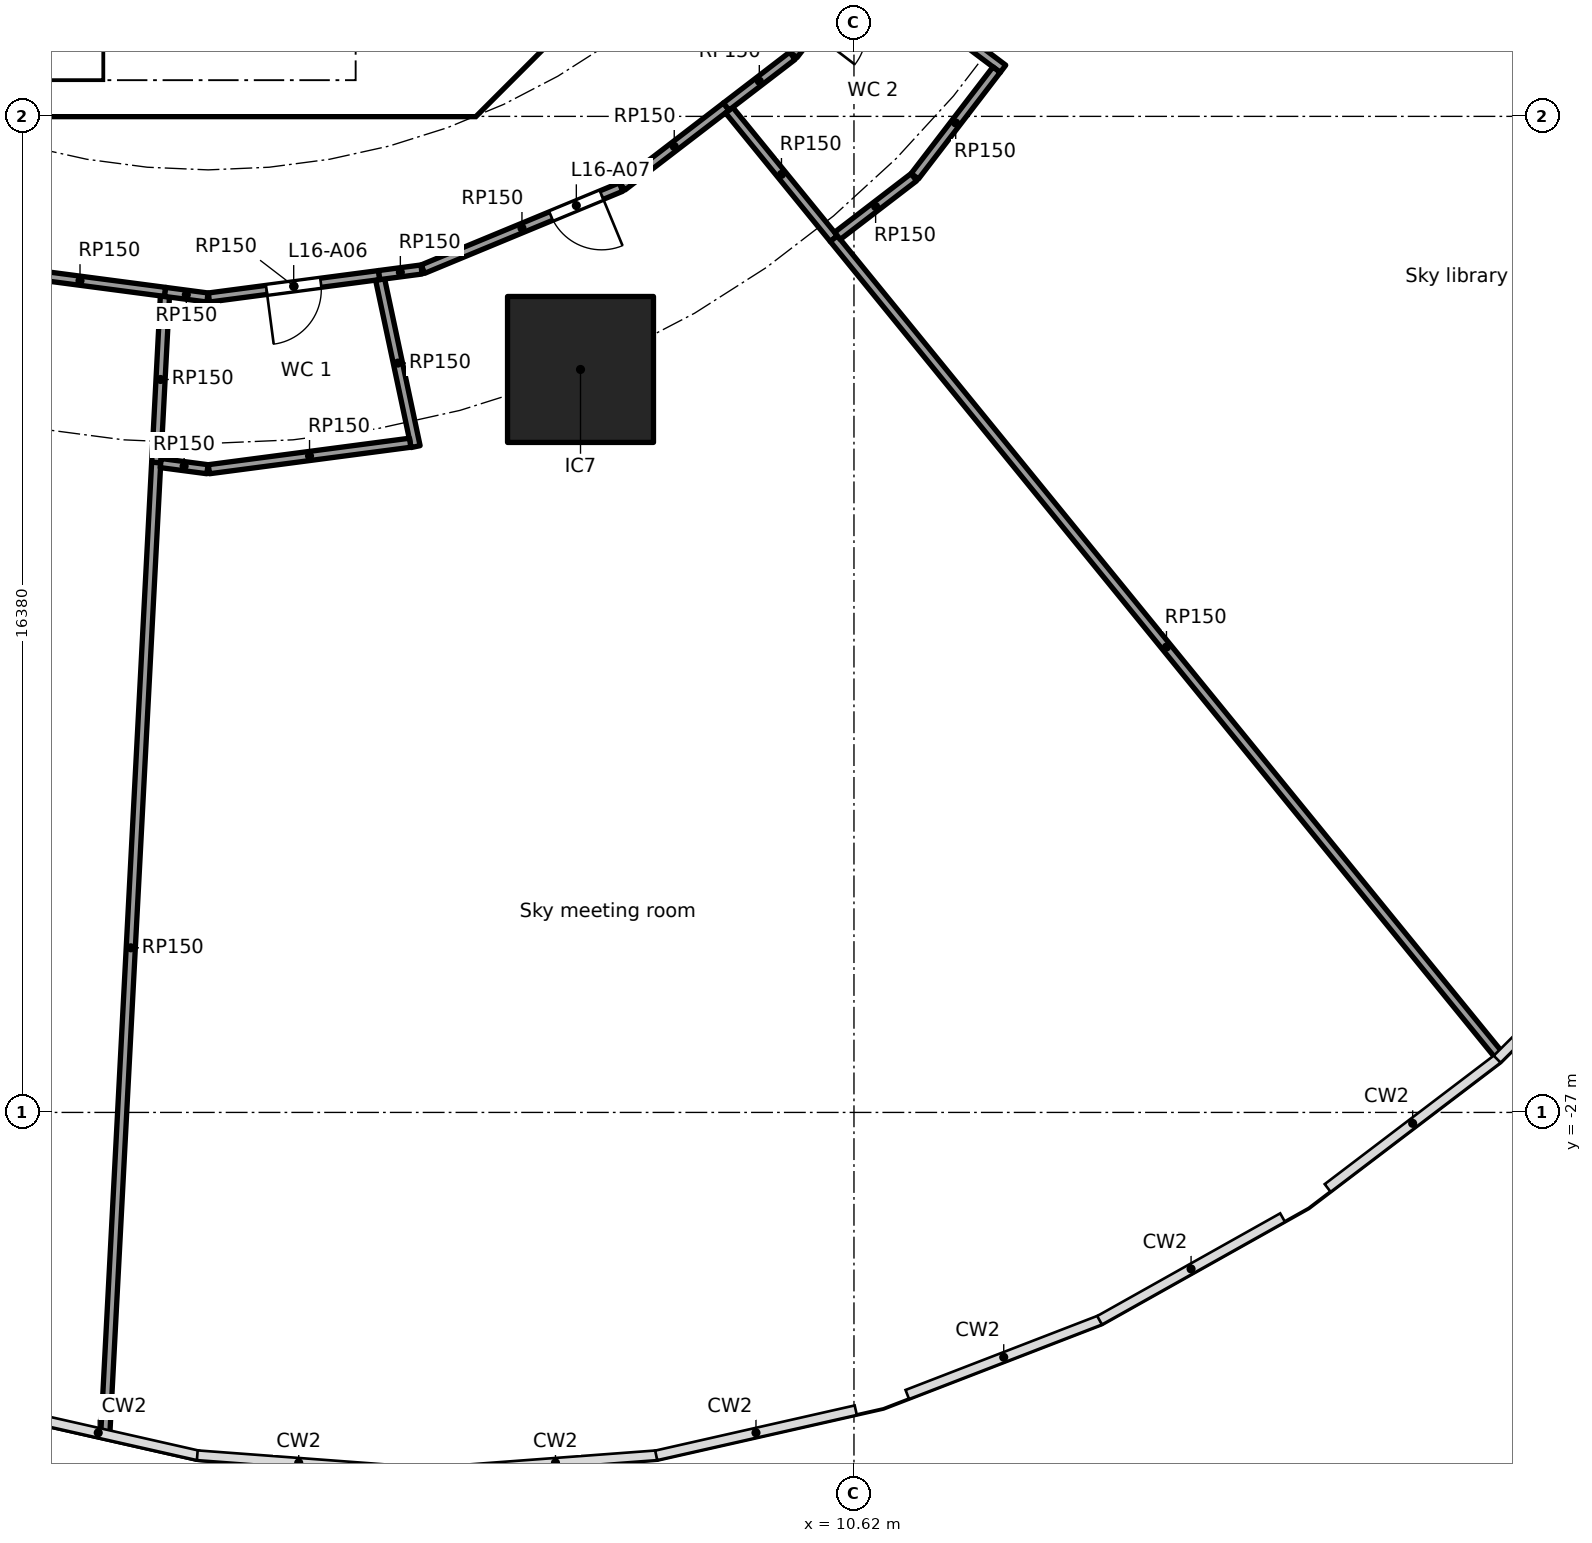
"""IFC4 building model, lengths in metres.
Left out: names, types, materials, properties, quantities, classifications, styles, units other than length and angle.
Written with IfcOpenShell. Run it as: python <this file> out.ifc"""

import sys

from ifc_helpers import new_model, si_unit, direction, frame, frame_2d, origin, origin_2d, place, context, subcontext, project, spatial, polyline, rectangle, outline, extrude, element, fill, save


model = new_model("IFC4")
c1 = context("Model", 3, precision=1e-05, world=origin(), true_north=direction((0.0, 1.0)))
c2 = subcontext(c1, "Body", "Model", "MODEL_VIEW")
j1 = project(units=[si_unit("LENGTHUNIT", "METRE"), si_unit("PLANEANGLEUNIT", "RADIAN")], contexts=[c1])
p1 = place(None, origin())
s1 = spatial("IfcSite", under=j1, at=p1, CompositionType="ELEMENT")
p2 = place(p1, origin())
s2 = spatial("IfcBuilding", under=s1, at=p2, CompositionType="ELEMENT")
p3 = place(p2, frame((0.0, 0.0, 67.7)))
s3 = spatial("IfcBuildingStorey", under=s2, at=p3, CompositionType="ELEMENT", Elevation=67.7)
p4 = place(p3, frame((6.123, -14.782, 0.0), z_axis=(0.0, 0.0, 1.0), x_axis=(1.0, 0.0, 0.0)))
e1 = element("IfcColumn", 1, at=p4, inside=s3, PredefinedType="COLUMN", context=c2, shape_type="SweptSolid", body=[
    extrude(rectangle(XDim=2.4, YDim=2.4, at=origin_2d()), origin(), (0.0, 0.0, 1.0), 5.6),
])
p5 = place(p3, frame((4.613, -9.988, 0.0), z_axis=(0.0, 0.0, 1.0), x_axis=(0.707106781187, 0.707106781187, 0.0)))
e2 = element("IfcWall", 2, at=p5, inside=s3, PredefinedType="SHEAR", context=c2, shape_type="SweptSolid", body=[
    extrude(rectangle(XDim=7.602, YDim=0.6, at=frame_2d((3.801, 0.0))), origin(), (0.0, 0.0, 1.0), 5.34),
])
p6 = place(p5, frame((3.201, 0.0, 0.0)))
e3 = element("IfcOpeningElement", 3, at=p6, cuts=e2, PredefinedType="OPENING", context=c2, shape_type="SweptSolid", body=[
    extrude(rectangle(XDim=1.2, YDim=2.1, at=frame_2d((0.6, 1.05))), frame((0.0, 0.31, 0.0), z_axis=(0.0, -1.0, 0.0), x_axis=(1.0, 0.0, 0.0)), (0.0, 0.0, 1.0), 0.62),
])
p7 = place(p3, frame((4.0, -10.025, 0.0), z_axis=(0.0, 0.0, 1.0), x_axis=(0.0, 1.0, 0.0)))
e4 = element("IfcWall", 4, at=p7, inside=s3, PredefinedType="SOLIDWALL", context=c2, shape_type="SweptSolid", body=[
    extrude(rectangle(XDim=3.0, YDim=0.2, at=frame_2d((1.5, 0.0))), origin(), (0.0, 0.0, 1.0), 5.34),
])
p8 = place(p7, frame((0.975, 0.0, 0.0)))
e5 = element("IfcOpeningElement", 5, at=p8, cuts=e4, PredefinedType="OPENING", context=c2, shape_type="SweptSolid", body=[
    extrude(rectangle(XDim=1.1, YDim=2.1, at=frame_2d((0.55, 1.05))), frame((0.0, 0.11, 0.0), z_axis=(0.0, -1.0, 0.0), x_axis=(1.0, 0.0, 0.0)), (0.0, 0.0, 1.0), 0.22),
])
p9 = place(p3, origin())
e6 = element("IfcWall", 6, at=p9, inside=s3, PredefinedType="SHEAR", context=c2, shape_type="SweptSolid", body=[
    extrude(outline(polyline([(-4.152, -10.025), (4.152, -10.025), (4.401, -9.776), (4.825, -10.2), (4.401, -10.625), (-4.401, -10.625), (-4.825, -10.2), (-4.401, -9.776), (-4.152, -10.025)])), origin(), (0.0, 0.0, 1.0), 5.34),
])
p10 = place(p3, frame((-0.855, -16.312, 0.0), z_axis=(0.0, 0.0, 1.0), x_axis=(-0.05232715486, -0.998629995977, 0.0)))
e7 = element("IfcWall", 7, at=p10, inside=s3, PredefinedType="PARTITIONING", context=c2, shape_type="SweptSolid", body=[
    extrude(rectangle(XDim=15.985, YDim=0.15, at=frame_2d((7.992, 0.0))), origin(), (0.0, 0.0, 1.0), 5.34),
])
p11 = place(p3, frame((-0.708, -13.507, 0.0), z_axis=(0.0, 0.0, 1.0), x_axis=(-0.991443994311, 0.130532778046, 0.0)))
e8 = element("IfcWall", 8, at=p11, inside=s3, PredefinedType="PARTITIONING", context=c2, shape_type="SweptSolid", body=[
    extrude(rectangle(XDim=2.824, YDim=0.15, at=frame_2d((1.412, 0.0))), origin(), (0.0, 0.0, 1.0), 5.34),
])
p12 = place(p3, frame((-0.712, -13.582, 0.0), z_axis=(0.0, 0.0, 1.0), x_axis=(-0.052343174033, -0.99862915646, 0.0)))
e9 = element("IfcWall", 9, at=p12, inside=s3, PredefinedType="PARTITIONING", context=c2, shape_type="SweptSolid", body=[
    extrude(rectangle(XDim=2.733, YDim=0.15, at=frame_2d((1.367, 0.0))), origin(), (0.0, 0.0, 1.0), 5.34),
])
p13 = place(p3, frame((-0.012, -16.423, 0.0), z_axis=(0.0, 0.0, 1.0), x_axis=(-0.991462869305, 0.130389335417, 0.0)))
e10 = element("IfcWall", 10, at=p13, inside=s3, PredefinedType="PARTITIONING", context=c2, shape_type="SweptSolid", body=[
    extrude(rectangle(XDim=0.775, YDim=0.15, at=frame_2d((0.388, 0.0))), origin(), (0.0, 0.0, 1.0), 5.34),
])
p14 = place(p3, frame((-0.012, -13.598, 0.0), z_axis=(0.0, 0.0, 1.0), x_axis=(-0.991466123966, 0.130364585024, 0.0)))
e11 = element("IfcWall", 11, at=p14, inside=s3, PredefinedType="PARTITIONING", context=c2, shape_type="SweptSolid", body=[
    extrude(rectangle(XDim=0.702, YDim=0.15, at=frame_2d((0.351, 0.0))), origin(), (0.0, 0.0, 1.0), 5.34),
])
p15 = place(p3, frame((2.812, -13.23, 0.0), z_axis=(0.0, 0.0, 1.0), x_axis=(-0.991445467051, -0.130521591565, 0.0)))
e12 = element("IfcWall", 12, at=p15, inside=s3, PredefinedType="PARTITIONING", context=c2, shape_type="SweptSolid", body=[
    extrude(rectangle(XDim=2.824, YDim=0.15, at=frame_2d((1.412, 0.0))), origin(), (0.0, 0.0, 1.0), 5.34),
])
p16 = place(p15, frame((0.968, 0.0, 0.0)))
e13 = element("IfcOpeningElement", 13, at=p16, cuts=e12, PredefinedType="OPENING", context=c2, shape_type="SweptSolid", body=[
    extrude(rectangle(XDim=0.9, YDim=2.1, at=frame_2d((0.45, 1.05))), frame((0.0, 0.085, 0.0), z_axis=(0.0, -1.0, 0.0), x_axis=(1.0, 0.0, 0.0)), (0.0, 0.0, 1.0), 0.17),
])
p17 = place(p3, frame((2.828, -13.303, 0.0), z_axis=(0.0, 0.0, 1.0), x_axis=(0.207920091501, -0.978145815076, 0.0)))
e14 = element("IfcWall", 14, at=p17, inside=s3, PredefinedType="PARTITIONING", context=c2, shape_type="SweptSolid", body=[
    extrude(rectangle(XDim=2.809, YDim=0.15, at=frame_2d((1.404, 0.0))), origin(), (0.0, 0.0, 1.0), 5.34),
])
p18 = place(p3, frame((3.321, -15.987, 0.0), z_axis=(0.0, 0.0, 1.0), x_axis=(-0.991441844339, -0.130549106827, 0.0)))
e15 = element("IfcWall", 15, at=p18, inside=s3, PredefinedType="PARTITIONING", context=c2, shape_type="SweptSolid", body=[
    extrude(rectangle(XDim=3.338, YDim=0.15, at=frame_2d((1.669, 0.0))), origin(), (0.0, 0.0, 1.0), 5.34),
])
p19 = place(p3, frame((3.508, -13.138, 0.0), z_axis=(0.0, 0.0, 1.0), x_axis=(-0.991460212813, -0.130409533429, 0.0)))
e16 = element("IfcWall", 16, at=p19, inside=s3, PredefinedType="PARTITIONING", context=c2, shape_type="SweptSolid", body=[
    extrude(rectangle(XDim=0.702, YDim=0.15, at=frame_2d((0.351, 0.0))), origin(), (0.0, 0.0, 1.0), 5.34),
])
p20 = place(p3, frame((6.789, -11.782, 0.0), z_axis=(0.0, 0.0, 1.0), x_axis=(-0.923881838111, -0.382677866108, 0.0)))
e17 = element("IfcWall", 17, at=p20, inside=s3, PredefinedType="PARTITIONING", context=c2, shape_type="SweptSolid", body=[
    extrude(rectangle(XDim=3.527, YDim=0.15, at=frame_2d((1.763, 0.0))), origin(), (0.0, 0.0, 1.0), 5.34),
])
p21 = place(p20, frame((0.346, 0.0, 0.0)))
e18 = element("IfcOpeningElement", 18, at=p21, cuts=e17, PredefinedType="OPENING", context=c2, shape_type="SweptSolid", body=[
    extrude(rectangle(XDim=0.9, YDim=2.1, at=frame_2d((0.45, 1.05))), frame((0.0, 0.085, 0.0), z_axis=(0.0, -1.0, 0.0), x_axis=(1.0, 0.0, 0.0)), (0.0, 0.0, 1.0), 0.17),
])
p22 = place(p3, frame((8.519, -10.459, 0.0), z_axis=(0.0, 0.0, 1.0), x_axis=(-0.793372937326, -0.608735888805, 0.0)))
e19 = element("IfcWall", 19, at=p22, inside=s3, PredefinedType="PARTITIONING", context=c2, shape_type="SweptSolid", body=[
    extrude(rectangle(XDim=2.155, YDim=0.15, at=frame_2d((1.078, 0.0))), origin(), (0.0, 0.0, 1.0), 5.34),
])
p23 = place(p3, frame((8.567, -10.517, 0.0), z_axis=(0.0, 0.0, 1.0), x_axis=(0.631573271363, -0.775316195432, 0.0)))
e20 = element("IfcWall", 20, at=p23, inside=s3, PredefinedType="PARTITIONING", context=c2, shape_type="SweptSolid", body=[
    extrude(rectangle(XDim=2.726, YDim=0.15, at=frame_2d((1.363, 0.0))), origin(), (0.0, 0.0, 1.0), 5.34),
])
p24 = place(p3, frame((9.607, -9.624, 0.0), z_axis=(0.0, 0.0, 1.0), x_axis=(-0.793371316762, -0.6087380009, 0.0)))
e21 = element("IfcWall", 21, at=p24, inside=s3, PredefinedType="PARTITIONING", context=c2, shape_type="SweptSolid", body=[
    extrude(rectangle(XDim=1.371, YDim=0.15, at=frame_2d((0.686, 0.0))), origin(), (0.0, 0.0, 1.0), 5.34),
])
p25 = place(p3, frame((10.288, -12.631, 0.0), z_axis=(0.0, 0.0, 1.0), x_axis=(0.631546535922, -0.77533797338, 0.0)))
e22 = element("IfcWall", 22, at=p25, inside=s3, PredefinedType="PARTITIONING", context=c2, shape_type="SweptSolid", body=[
    extrude(rectangle(XDim=17.325, YDim=0.15, at=frame_2d((8.663, 0.0))), origin(), (0.0, 0.0, 1.0), 5.34),
])
p26 = place(p3, frame((10.774, -8.109, 0.0), z_axis=(0.0, 0.0, 1.0), x_axis=(-0.608754453805, -0.793358692504, 0.0)))
e23 = element("IfcWall", 23, at=p26, inside=s3, PredefinedType="PARTITIONING", context=c2, shape_type="SweptSolid", body=[
    extrude(rectangle(XDim=1.888, YDim=0.15, at=frame_2d((0.944, 0.0))), origin(), (0.0, 0.0, 1.0), 5.34),
])
p27 = place(p26, frame((0.5, 0.0, 0.0)))
e24 = element("IfcOpeningElement", 24, at=p27, cuts=e23, PredefinedType="OPENING", context=c2, shape_type="SweptSolid", body=[
    extrude(rectangle(XDim=0.9, YDim=2.1, at=frame_2d((0.45, 1.05))), frame((0.0, 0.085, 0.0), z_axis=(0.0, -1.0, 0.0), x_axis=(1.0, 0.0, 0.0)), (0.0, 0.0, 1.0), 0.17),
])
p28 = place(p3, frame((10.833, -8.154, 0.0), z_axis=(0.0, 0.0, 1.0), x_axis=(0.798994468734, -0.601338373075, 0.0)))
e25 = element("IfcWall", 25, at=p28, inside=s3, PredefinedType="PARTITIONING", context=c2, shape_type="SweptSolid", body=[
    extrude(rectangle(XDim=2.8, YDim=0.15, at=frame_2d((1.4, 0.0))), origin(), (0.0, 0.0, 1.0), 5.34),
])
p29 = place(p3, frame((11.604, -11.621, 0.0), z_axis=(0.0, 0.0, 1.0), x_axis=(-0.793328373205, -0.608793965368, 0.0)))
e26 = element("IfcWall", 26, at=p29, inside=s3, PredefinedType="PARTITIONING", context=c2, shape_type="SweptSolid", body=[
    extrude(rectangle(XDim=1.584, YDim=0.15, at=frame_2d((0.792, 0.0))), origin(), (0.0, 0.0, 1.0), 5.34),
])
p30 = place(p3, frame((12.965, -9.852, 0.0), z_axis=(0.0, 0.0, 1.0), x_axis=(-0.608737875962, -0.793371412624, 0.0)))
e27 = element("IfcWall", 27, at=p30, inside=s3, PredefinedType="PARTITIONING", context=c2, shape_type="SweptSolid", body=[
    extrude(rectangle(XDim=2.208, YDim=0.15, at=frame_2d((1.104, 0.0))), origin(), (0.0, 0.0, 1.0), 5.34),
])
p31 = place(p16, origin())
e28 = element("IfcDoor", 28, at=p31, inside=s3, OperationType="SINGLE_SWING_RIGHT", PredefinedType="DOOR", context=c2, shape_type="SweptSolid", body=[
    extrude(rectangle(XDim=0.9, YDim=2.1, at=frame_2d((0.45, 1.05))), frame((0.0, 0.025, 0.0), z_axis=(0.0, -1.0, 0.0), x_axis=(1.0, 0.0, 0.0)), (0.0, 0.0, 1.0), 0.05),
])
fill(e13, e28)
p32 = place(p21, origin())
e29 = element("IfcDoor", 29, at=p32, inside=s3, OperationType="SINGLE_SWING_LEFT", PredefinedType="DOOR", context=c2, shape_type="SweptSolid", body=[
    extrude(rectangle(XDim=0.9, YDim=2.1, at=frame_2d((0.45, 1.05))), frame((0.0, 0.025, 0.0), z_axis=(0.0, -1.0, 0.0), x_axis=(1.0, 0.0, 0.0)), (0.0, 0.0, 1.0), 0.05),
])
fill(e18, e29)
save(model, sys.argv[1])
